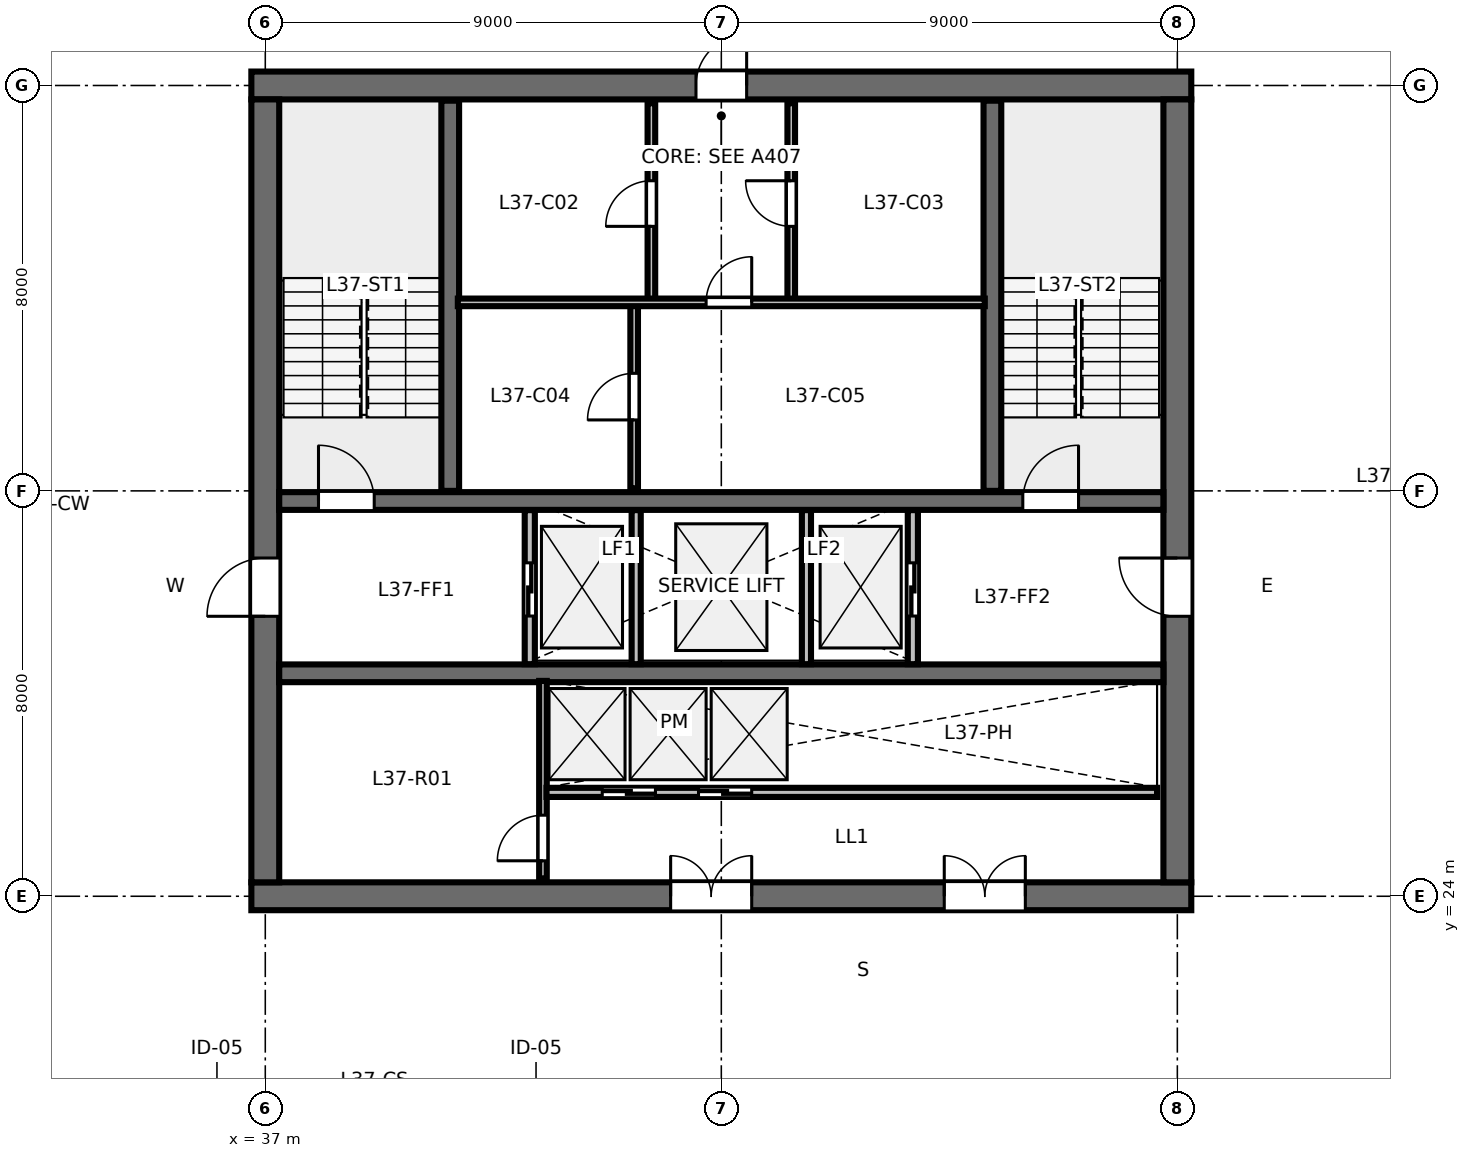
"""IFC4 building model, lengths in metres.
Left out: names, types, materials, properties, quantities, classifications, styles, units other than length and angle.
Written with IfcOpenShell. Run it as: python <this file> out.ifc"""

import sys

from ifc_helpers import new_model, si_unit, direction, frame, frame_2d, origin, place, context, subcontext, project, spatial, rectangle, extrude, element, fill, save


model = new_model("IFC4")
c1 = context("Model", 3, precision=1e-05, world=origin(), true_north=direction((0.0, 1.0)))
c2 = subcontext(c1, "Body", "Model", "MODEL_VIEW")
j1 = project(units=[si_unit("LENGTHUNIT", "METRE"), si_unit("PLANEANGLEUNIT", "RADIAN")], contexts=[c1])
p1 = place(None, origin())
s1 = spatial("IfcSite", under=j1, at=p1, CompositionType="ELEMENT")
p2 = place(p1, origin())
s2 = spatial("IfcBuilding", under=s1, at=p2, CompositionType="ELEMENT")
p3 = place(p2, frame((0.0, 0.0, 142.0)))
s3 = spatial("IfcBuildingStorey", under=s2, at=p3, CompositionType="ELEMENT", Elevation=142.0)
p4 = place(p3, frame((36.725, 24.0, 0.0), z_axis=(0.0, 0.0, 1.0), x_axis=(1.0, 0.0, 0.0)))
e1 = element("IfcWall", 1, at=p4, inside=s3, PredefinedType="SHEAR", context=c2, shape_type="SweptSolid", body=[
    extrude(rectangle(XDim=18.55, YDim=0.55, at=frame_2d((9.275, 0.0))), origin(), (0.0, 0.0, 1.0), 3.36),
])
p5 = place(p4, frame((8.275, 0.0, 0.0)))
e2 = element("IfcOpeningElement", 2, at=p5, cuts=e1, PredefinedType="OPENING", context=c2, shape_type="SweptSolid", body=[
    extrude(rectangle(XDim=1.6, YDim=2.15, at=frame_2d((0.8, 1.075))), frame((0.0, 0.285, 0.0), z_axis=(0.0, -1.0, 0.0), x_axis=(1.0, 0.0, 0.0)), (0.0, 0.0, 1.0), 0.57),
])
p6 = place(p4, frame((13.675, 0.0, 0.0)))
e3 = element("IfcOpeningElement", 3, at=p6, cuts=e1, PredefinedType="OPENING", context=c2, shape_type="SweptSolid", body=[
    extrude(rectangle(XDim=1.6, YDim=2.15, at=frame_2d((0.8, 1.075))), frame((0.0, 0.285, 0.0), z_axis=(0.0, -1.0, 0.0), x_axis=(1.0, 0.0, 0.0)), (0.0, 0.0, 1.0), 0.57),
])
p7 = place(p3, frame((36.725, 40.0, 0.0), z_axis=(0.0, 0.0, 1.0), x_axis=(1.0, 0.0, 0.0)))
e4 = element("IfcWall", 4, at=p7, inside=s3, PredefinedType="SHEAR", context=c2, shape_type="SweptSolid", body=[
    extrude(rectangle(XDim=18.55, YDim=0.55, at=frame_2d((9.275, 0.0))), origin(), (0.0, 0.0, 1.0), 3.36),
])
p8 = place(p7, frame((8.775, 0.0, 0.0)))
e5 = element("IfcOpeningElement", 5, at=p8, cuts=e4, PredefinedType="OPENING", context=c2, shape_type="SweptSolid", body=[
    extrude(rectangle(XDim=1.0, YDim=2.15, at=frame_2d((0.5, 1.075))), frame((0.0, 0.285, 0.0), z_axis=(0.0, -1.0, 0.0), x_axis=(1.0, 0.0, 0.0)), (0.0, 0.0, 1.0), 0.57),
])
p9 = place(p3, frame((37.0, 24.275, 0.0), z_axis=(0.0, 0.0, 1.0), x_axis=(0.0, 1.0, 0.0)))
e6 = element("IfcWall", 6, at=p9, inside=s3, PredefinedType="SHEAR", context=c2, shape_type="SweptSolid", body=[
    extrude(rectangle(XDim=15.45, YDim=0.55, at=frame_2d((7.725, 0.0))), origin(), (0.0, 0.0, 1.0), 3.36),
])
p10 = place(p9, frame((5.25, 0.0, 0.0)))
e7 = element("IfcOpeningElement", 7, at=p10, cuts=e6, PredefinedType="OPENING", context=c2, shape_type="SweptSolid", body=[
    extrude(rectangle(XDim=1.15, YDim=2.15, at=frame_2d((0.575, 1.075))), frame((0.0, 0.285, 0.0), z_axis=(0.0, -1.0, 0.0), x_axis=(1.0, 0.0, 0.0)), (0.0, 0.0, 1.0), 0.57),
])
p11 = place(p3, frame((55.0, 24.275, 0.0), z_axis=(0.0, 0.0, 1.0), x_axis=(0.0, 1.0, 0.0)))
e8 = element("IfcWall", 8, at=p11, inside=s3, PredefinedType="SHEAR", context=c2, shape_type="SweptSolid", body=[
    extrude(rectangle(XDim=15.45, YDim=0.55, at=frame_2d((7.725, 0.0))), origin(), (0.0, 0.0, 1.0), 3.36),
])
p12 = place(p11, frame((5.25, 0.0, 0.0)))
e9 = element("IfcOpeningElement", 9, at=p12, cuts=e8, PredefinedType="OPENING", context=c2, shape_type="SweptSolid", body=[
    extrude(rectangle(XDim=1.15, YDim=2.15, at=frame_2d((0.575, 1.075))), frame((0.0, 0.285, 0.0), z_axis=(0.0, -1.0, 0.0), x_axis=(1.0, 0.0, 0.0)), (0.0, 0.0, 1.0), 0.57),
])
p13 = place(p3, frame((37.275, 31.8, 0.0), z_axis=(0.0, 0.0, 1.0), x_axis=(1.0, 0.0, 0.0)))
e10 = element("IfcWall", 10, at=p13, inside=s3, PredefinedType="SHEAR", context=c2, shape_type="SweptSolid", body=[
    extrude(rectangle(XDim=17.45, YDim=0.35, at=frame_2d((8.725, 0.0))), origin(), (0.0, 0.0, 1.0), 3.36),
])
p14 = place(p13, frame((0.775, 0.0, 0.0)))
e11 = element("IfcOpeningElement", 11, at=p14, cuts=e10, PredefinedType="OPENING", context=c2, shape_type="SweptSolid", body=[
    extrude(rectangle(XDim=1.1, YDim=2.15, at=frame_2d((0.55, 1.075))), frame((0.0, 0.185, 0.0), z_axis=(0.0, -1.0, 0.0), x_axis=(1.0, 0.0, 0.0)), (0.0, 0.0, 1.0), 0.37),
])
p15 = place(p13, frame((14.675, 0.0, 0.0)))
e12 = element("IfcOpeningElement", 12, at=p15, cuts=e10, PredefinedType="OPENING", context=c2, shape_type="SweptSolid", body=[
    extrude(rectangle(XDim=1.1, YDim=2.15, at=frame_2d((0.55, 1.075))), frame((0.0, 0.185, 0.0), z_axis=(0.0, -1.0, 0.0), x_axis=(1.0, 0.0, 0.0)), (0.0, 0.0, 1.0), 0.37),
])
p16 = place(p3, frame((37.275, 28.4, 0.0), z_axis=(0.0, 0.0, 1.0), x_axis=(1.0, 0.0, 0.0)))
e13 = element("IfcWall", 13, at=p16, inside=s3, PredefinedType="SHEAR", context=c2, shape_type="SweptSolid", body=[
    extrude(rectangle(XDim=17.45, YDim=0.35, at=frame_2d((8.725, 0.0))), origin(), (0.0, 0.0, 1.0), 3.36),
])
for number, where, z_axis, x_axis in (
    (14, (40.65, 32.0, 0.0), (0.0, 0.0, 1.0), (0.0, 1.0, 0.0)),
    (15, (51.35, 32.0, 0.0), (0.0, 0.0, 1.0), (0.0, 1.0, 0.0)),
):
    element("IfcWall", number, at=place(p3, frame(where, z_axis=z_axis, x_axis=x_axis)), inside=s3, PredefinedType="SHEAR", context=c2, shape_type="SweptSolid", body=[
        extrude(rectangle(XDim=7.7, YDim=0.35, at=frame_2d((3.85, 0.0))), origin(), (0.0, 0.0, 1.0), 3.6),
    ])
p17 = place(p3, frame((44.62, 35.72, 0.0), z_axis=(0.0, 0.0, 1.0), x_axis=(0.0, 1.0, 0.0)))
e16 = element("IfcWall", 16, at=p17, inside=s3, PredefinedType="PARTITIONING", context=c2, shape_type="SweptSolid", body=[
    extrude(rectangle(XDim=3.93, YDim=0.15, at=frame_2d((1.965, 0.0))), origin(), (0.0, 0.0, 1.0), 3.36),
])
p18 = place(p17, frame((1.5, 0.0, 0.0)))
e17 = element("IfcOpeningElement", 17, at=p18, cuts=e16, PredefinedType="OPENING", context=c2, shape_type="SweptSolid", body=[
    extrude(rectangle(XDim=0.9, YDim=2.15, at=frame_2d((0.45, 1.075))), frame((0.0, 0.085, 0.0), z_axis=(0.0, -1.0, 0.0), x_axis=(1.0, 0.0, 0.0)), (0.0, 0.0, 1.0), 0.17),
])
p19 = place(p3, frame((47.38, 35.72, 0.0), z_axis=(0.0, 0.0, 1.0), x_axis=(0.0, 1.0, 0.0)))
e18 = element("IfcWall", 18, at=p19, inside=s3, PredefinedType="PARTITIONING", context=c2, shape_type="SweptSolid", body=[
    extrude(rectangle(XDim=3.93, YDim=0.15, at=frame_2d((1.965, 0.0))), origin(), (0.0, 0.0, 1.0), 3.36),
])
p20 = place(p19, frame((1.5, 0.0, 0.0)))
e19 = element("IfcOpeningElement", 19, at=p20, cuts=e18, PredefinedType="OPENING", context=c2, shape_type="SweptSolid", body=[
    extrude(rectangle(XDim=0.9, YDim=2.15, at=frame_2d((0.45, 1.075))), frame((0.0, 0.085, 0.0), z_axis=(0.0, -1.0, 0.0), x_axis=(1.0, 0.0, 0.0)), (0.0, 0.0, 1.0), 0.17),
])
p21 = place(p3, frame((44.28, 32.05, 0.0), z_axis=(0.0, 0.0, 1.0), x_axis=(0.0, 1.0, 0.0)))
e20 = element("IfcWall", 20, at=p21, inside=s3, PredefinedType="PARTITIONING", context=c2, shape_type="SweptSolid", body=[
    extrude(rectangle(XDim=3.67, YDim=0.15, at=frame_2d((1.835, 0.0))), origin(), (0.0, 0.0, 1.0), 3.36),
])
p22 = place(p21, frame((1.35, 0.0, 0.0)))
e21 = element("IfcOpeningElement", 21, at=p22, cuts=e20, PredefinedType="OPENING", context=c2, shape_type="SweptSolid", body=[
    extrude(rectangle(XDim=0.92, YDim=2.15, at=frame_2d((0.46, 1.075))), frame((0.0, 0.085, 0.0), z_axis=(0.0, -1.0, 0.0), x_axis=(1.0, 0.0, 0.0)), (0.0, 0.0, 1.0), 0.17),
])
p23 = place(p3, frame((40.8, 35.72, 0.0), z_axis=(0.0, 0.0, 1.0), x_axis=(1.0, 0.0, 0.0)))
e22 = element("IfcWall", 22, at=p23, inside=s3, PredefinedType="PARTITIONING", context=c2, shape_type="SweptSolid", body=[
    extrude(rectangle(XDim=10.4, YDim=0.15, at=frame_2d((5.2, 0.0))), origin(), (0.0, 0.0, 1.0), 3.36),
])
p24 = place(p23, frame((4.9, 0.0, 0.0)))
e23 = element("IfcOpeningElement", 23, at=p24, cuts=e22, PredefinedType="OPENING", context=c2, shape_type="SweptSolid", body=[
    extrude(rectangle(XDim=0.9, YDim=2.15, at=frame_2d((0.45, 1.075))), frame((0.0, 0.085, 0.0), z_axis=(0.0, -1.0, 0.0), x_axis=(1.0, 0.0, 0.0)), (0.0, 0.0, 1.0), 0.17),
])
p25 = place(p3, frame((42.22, 28.58, 0.0), z_axis=(0.0, 0.0, 1.0), x_axis=(0.0, 1.0, 0.0)))
e24 = element("IfcWall", 24, at=p25, inside=s3, PredefinedType="PARTITIONING", context=c2, shape_type="SweptSolid", body=[
    extrude(rectangle(XDim=3.04, YDim=0.2, at=frame_2d((1.52, 0.0))), origin(), (0.0, 0.0, 1.0), 3.36),
])
p26 = place(p25, frame((0.95, 0.0, 0.0)))
e25 = element("IfcOpeningElement", 25, at=p26, cuts=e24, PredefinedType="OPENING", context=c2, shape_type="SweptSolid", body=[
    extrude(rectangle(XDim=1.05, YDim=2.15, at=frame_2d((0.525, 1.075))), frame((0.0, 0.11, 0.0), z_axis=(0.0, -1.0, 0.0), x_axis=(1.0, 0.0, 0.0)), (0.0, 0.0, 1.0), 0.22),
])
p27 = place(p3, frame((49.78, 28.58, 0.0), z_axis=(0.0, 0.0, 1.0), x_axis=(0.0, 1.0, 0.0)))
e26 = element("IfcWall", 26, at=p27, inside=s3, PredefinedType="PARTITIONING", context=c2, shape_type="SweptSolid", body=[
    extrude(rectangle(XDim=3.04, YDim=0.2, at=frame_2d((1.52, 0.0))), origin(), (0.0, 0.0, 1.0), 3.36),
])
p28 = place(p27, frame((0.95, 0.0, 0.0)))
e27 = element("IfcOpeningElement", 27, at=p28, cuts=e26, PredefinedType="OPENING", context=c2, shape_type="SweptSolid", body=[
    extrude(rectangle(XDim=1.05, YDim=2.15, at=frame_2d((0.525, 1.075))), frame((0.0, 0.11, 0.0), z_axis=(0.0, -1.0, 0.0), x_axis=(1.0, 0.0, 0.0)), (0.0, 0.0, 1.0), 0.22),
])
for number, where, z_axis, x_axis in (
    (28, (44.32, 28.58, 0.0), (0.0, 0.0, 1.0), (0.0, 1.0, 0.0)),
    (29, (47.68, 28.58, 0.0), (0.0, 0.0, 1.0), (0.0, 1.0, 0.0)),
):
    element("IfcWall", number, at=place(p3, frame(where, z_axis=z_axis, x_axis=x_axis)), inside=s3, PredefinedType="PARTITIONING", context=c2, shape_type="SweptSolid", body=[
        extrude(rectangle(XDim=3.04, YDim=0.18, at=frame_2d((1.52, 0.0))), origin(), (0.0, 0.0, 1.0), 3.36),
    ])
p29 = place(p3, frame((42.48, 24.35, 0.0), z_axis=(0.0, 0.0, 1.0), x_axis=(0.0, 1.0, 0.0)))
e30 = element("IfcWall", 30, at=p29, inside=s3, PredefinedType="PARTITIONING", context=c2, shape_type="SweptSolid", body=[
    extrude(rectangle(XDim=3.9, YDim=0.15, at=frame_2d((1.95, 0.0))), origin(), (0.0, 0.0, 1.0), 3.36),
])
p30 = place(p29, frame((0.35, 0.0, 0.0)))
e31 = element("IfcOpeningElement", 31, at=p30, cuts=e30, PredefinedType="OPENING", context=c2, shape_type="SweptSolid", body=[
    extrude(rectangle(XDim=0.9, YDim=2.15, at=frame_2d((0.45, 1.075))), frame((0.0, 0.085, 0.0), z_axis=(0.0, -1.0, 0.0), x_axis=(1.0, 0.0, 0.0)), (0.0, 0.0, 1.0), 0.17),
])
p31 = place(p3, frame((42.55, 26.05, 0.0), z_axis=(0.0, 0.0, 1.0), x_axis=(1.0, 0.0, 0.0)))
e32 = element("IfcWall", 32, at=p31, inside=s3, PredefinedType="PARTITIONING", context=c2, shape_type="SweptSolid", body=[
    extrude(rectangle(XDim=12.05, YDim=0.18, at=frame_2d((6.025, 0.0))), origin(), (0.0, 0.0, 1.0), 3.36),
])
p32 = place(p31, frame((1.1, 0.0, 0.0)))
e33 = element("IfcOpeningElement", 33, at=p32, cuts=e32, PredefinedType="OPENING", context=c2, shape_type="SweptSolid", body=[
    extrude(rectangle(XDim=1.05, YDim=2.15, at=frame_2d((0.525, 1.075))), frame((0.0, 0.1, 0.0), z_axis=(0.0, -1.0, 0.0), x_axis=(1.0, 0.0, 0.0)), (0.0, 0.0, 1.0), 0.2),
])
p33 = place(p31, frame((3.0, 0.0, 0.0)))
e34 = element("IfcOpeningElement", 34, at=p33, cuts=e32, PredefinedType="OPENING", context=c2, shape_type="SweptSolid", body=[
    extrude(rectangle(XDim=1.05, YDim=2.15, at=frame_2d((0.525, 1.075))), frame((0.0, 0.1, 0.0), z_axis=(0.0, -1.0, 0.0), x_axis=(1.0, 0.0, 0.0)), (0.0, 0.0, 1.0), 0.2),
])
p34 = place(p14, origin())
e35 = element("IfcDoor", 35, at=p34, inside=s3, OperationType="SINGLE_SWING_LEFT", PredefinedType="DOOR", context=c2, shape_type="SweptSolid", body=[
    extrude(rectangle(XDim=1.1, YDim=2.15, at=frame_2d((0.55, 1.075))), frame((0.0, 0.025, 0.0), z_axis=(0.0, -1.0, 0.0), x_axis=(1.0, 0.0, 0.0)), (0.0, 0.0, 1.0), 0.05),
])
fill(e11, e35)
p35 = place(p15, origin())
e36 = element("IfcDoor", 36, at=p35, inside=s3, OperationType="SINGLE_SWING_RIGHT", PredefinedType="DOOR", context=c2, shape_type="SweptSolid", body=[
    extrude(rectangle(XDim=1.1, YDim=2.15, at=frame_2d((0.55, 1.075))), frame((0.0, 0.025, 0.0), z_axis=(0.0, -1.0, 0.0), x_axis=(1.0, 0.0, 0.0)), (0.0, 0.0, 1.0), 0.05),
])
fill(e12, e36)
p36 = place(p8, origin())
e37 = element("IfcDoor", 37, at=p36, inside=s3, OperationType="SINGLE_SWING_RIGHT", PredefinedType="DOOR", context=c2, shape_type="SweptSolid", body=[
    extrude(rectangle(XDim=1.0, YDim=2.15, at=frame_2d((0.5, 1.075))), frame((0.0, 0.025, 0.0), z_axis=(0.0, -1.0, 0.0), x_axis=(1.0, 0.0, 0.0)), (0.0, 0.0, 1.0), 0.05),
])
fill(e5, e37)
p37 = place(p10, origin())
e38 = element("IfcDoor", 38, at=p37, inside=s3, OperationType="SINGLE_SWING_LEFT", PredefinedType="DOOR", context=c2, shape_type="SweptSolid", body=[
    extrude(rectangle(XDim=1.15, YDim=2.15, at=frame_2d((0.575, 1.075))), frame((0.0, 0.025, 0.0), z_axis=(0.0, -1.0, 0.0), x_axis=(1.0, 0.0, 0.0)), (0.0, 0.0, 1.0), 0.05),
])
fill(e7, e38)
p38 = place(p12, origin())
e39 = element("IfcDoor", 39, at=p38, inside=s3, OperationType="SINGLE_SWING_RIGHT", PredefinedType="DOOR", context=c2, shape_type="SweptSolid", body=[
    extrude(rectangle(XDim=1.15, YDim=2.15, at=frame_2d((0.575, 1.075))), frame((0.0, 0.025, 0.0), z_axis=(0.0, -1.0, 0.0), x_axis=(1.0, 0.0, 0.0)), (0.0, 0.0, 1.0), 0.05),
])
fill(e9, e39)
p39 = place(p5, origin())
e40 = element("IfcDoor", 40, at=p39, inside=s3, OperationType="DOUBLE_DOOR_SINGLE_SWING", PredefinedType="DOOR", context=c2, shape_type="SweptSolid", body=[
    extrude(rectangle(XDim=1.6, YDim=2.15, at=frame_2d((0.8, 1.075))), frame((0.0, 0.025, 0.0), z_axis=(0.0, -1.0, 0.0), x_axis=(1.0, 0.0, 0.0)), (0.0, 0.0, 1.0), 0.05),
])
fill(e2, e40)
p40 = place(p6, origin())
e41 = element("IfcDoor", 41, at=p40, inside=s3, OperationType="DOUBLE_DOOR_SINGLE_SWING", PredefinedType="DOOR", context=c2, shape_type="SweptSolid", body=[
    extrude(rectangle(XDim=1.6, YDim=2.15, at=frame_2d((0.8, 1.075))), frame((0.0, 0.025, 0.0), z_axis=(0.0, -1.0, 0.0), x_axis=(1.0, 0.0, 0.0)), (0.0, 0.0, 1.0), 0.05),
])
fill(e3, e41)
p41 = place(p18, origin())
e42 = element("IfcDoor", 42, at=p41, inside=s3, OperationType="SINGLE_SWING_LEFT", PredefinedType="DOOR", context=c2, shape_type="SweptSolid", body=[
    extrude(rectangle(XDim=0.9, YDim=2.15, at=frame_2d((0.45, 1.075))), frame((0.0, 0.025, 0.0), z_axis=(0.0, -1.0, 0.0), x_axis=(1.0, 0.0, 0.0)), (0.0, 0.0, 1.0), 0.05),
])
fill(e17, e42)
p42 = place(p20, origin())
e43 = element("IfcDoor", 43, at=p42, inside=s3, OperationType="SINGLE_SWING_RIGHT", PredefinedType="DOOR", context=c2, shape_type="SweptSolid", body=[
    extrude(rectangle(XDim=0.9, YDim=2.15, at=frame_2d((0.45, 1.075))), frame((0.0, 0.025, 0.0), z_axis=(0.0, -1.0, 0.0), x_axis=(1.0, 0.0, 0.0)), (0.0, 0.0, 1.0), 0.05),
])
fill(e19, e43)
p43 = place(p22, origin())
e44 = element("IfcDoor", 44, at=p43, inside=s3, OperationType="SINGLE_SWING_LEFT", PredefinedType="DOOR", context=c2, shape_type="SweptSolid", body=[
    extrude(rectangle(XDim=0.92, YDim=2.15, at=frame_2d((0.46, 1.075))), frame((0.0, 0.025, 0.0), z_axis=(0.0, -1.0, 0.0), x_axis=(1.0, 0.0, 0.0)), (0.0, 0.0, 1.0), 0.05),
])
fill(e21, e44)
p44 = place(p24, origin())
e45 = element("IfcDoor", 45, at=p44, inside=s3, OperationType="SINGLE_SWING_RIGHT", PredefinedType="DOOR", context=c2, shape_type="SweptSolid", body=[
    extrude(rectangle(XDim=0.9, YDim=2.15, at=frame_2d((0.45, 1.075))), frame((0.0, 0.025, 0.0), z_axis=(0.0, -1.0, 0.0), x_axis=(1.0, 0.0, 0.0)), (0.0, 0.0, 1.0), 0.05),
])
fill(e23, e45)
p45 = place(p26, origin())
e46 = element("IfcDoor", 46, at=p45, inside=s3, OperationType="SLIDING_TO_LEFT", PredefinedType="DOOR", context=c2, shape_type="SweptSolid", body=[
    extrude(rectangle(XDim=1.05, YDim=2.15, at=frame_2d((0.525, 1.075))), frame((0.0, 0.025, 0.0), z_axis=(0.0, -1.0, 0.0), x_axis=(1.0, 0.0, 0.0)), (0.0, 0.0, 1.0), 0.05),
])
fill(e25, e46)
p46 = place(p28, origin())
e47 = element("IfcDoor", 47, at=p46, inside=s3, OperationType="SLIDING_TO_RIGHT", PredefinedType="DOOR", context=c2, shape_type="SweptSolid", body=[
    extrude(rectangle(XDim=1.05, YDim=2.15, at=frame_2d((0.525, 1.075))), frame((0.0, 0.025, 0.0), z_axis=(0.0, -1.0, 0.0), x_axis=(1.0, 0.0, 0.0)), (0.0, 0.0, 1.0), 0.05),
])
fill(e27, e47)
p47 = place(p30, origin())
e48 = element("IfcDoor", 48, at=p47, inside=s3, OperationType="SINGLE_SWING_LEFT", PredefinedType="DOOR", context=c2, shape_type="SweptSolid", body=[
    extrude(rectangle(XDim=0.9, YDim=2.15, at=frame_2d((0.45, 1.075))), frame((0.0, 0.025, 0.0), z_axis=(0.0, -1.0, 0.0), x_axis=(1.0, 0.0, 0.0)), (0.0, 0.0, 1.0), 0.05),
])
fill(e31, e48)
p48 = place(p32, origin())
e49 = element("IfcDoor", 49, at=p48, inside=s3, OperationType="SLIDING_TO_LEFT", PredefinedType="DOOR", context=c2, shape_type="SweptSolid", body=[
    extrude(rectangle(XDim=1.05, YDim=2.15, at=frame_2d((0.525, 1.075))), frame((0.0, 0.025, 0.0), z_axis=(0.0, -1.0, 0.0), x_axis=(1.0, 0.0, 0.0)), (0.0, 0.0, 1.0), 0.05),
])
fill(e33, e49)
p49 = place(p33, origin())
e50 = element("IfcDoor", 50, at=p49, inside=s3, OperationType="SLIDING_TO_RIGHT", PredefinedType="DOOR", context=c2, shape_type="SweptSolid", body=[
    extrude(rectangle(XDim=1.05, YDim=2.15, at=frame_2d((0.525, 1.075))), frame((0.0, 0.025, 0.0), z_axis=(0.0, -1.0, 0.0), x_axis=(1.0, 0.0, 0.0)), (0.0, 0.0, 1.0), 0.05),
])
fill(e34, e50)
save(model, sys.argv[1])
